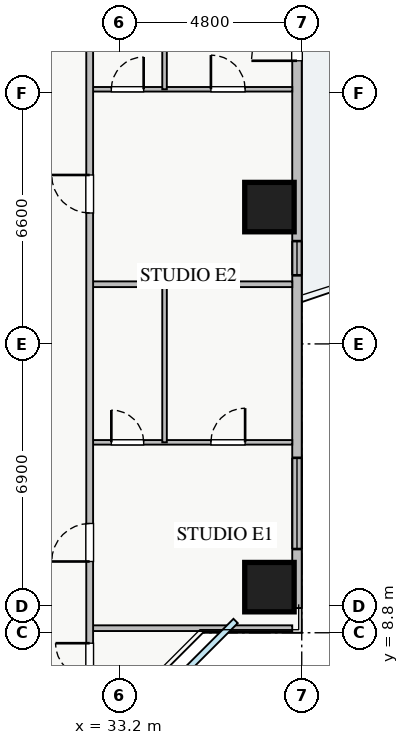
"""IFC4 building model, lengths in metres.
Left out: names, types, materials, properties, quantities, classifications, styles, units other than length and angle.
Written with IfcOpenShell. Run it as: python <this file> out.ifc"""

import sys

from ifc_helpers import new_model, si_unit, direction, frame, frame_2d, origin, origin_2d, place, context, subcontext, project, spatial, rectangle, extrude, source, transform, mapped, element, fill, save


model = new_model("IFC4")
c1 = context("Model", 3, precision=1e-05, world=origin(), true_north=direction((0.0, 1.0)))
c2 = subcontext(c1, "Body", "Model", "MODEL_VIEW")
j1 = project(units=[si_unit("LENGTHUNIT", "METRE"), si_unit("PLANEANGLEUNIT", "RADIAN")], contexts=[c1])
p1 = place(None, origin())
s1 = spatial("IfcSite", under=j1, at=p1, CompositionType="ELEMENT")
p2 = place(p1, origin())
s2 = spatial("IfcBuilding", under=s1, at=p2, CompositionType="ELEMENT")
p3 = place(p2, frame((0.0, 0.0, 36.0)))
s3 = spatial("IfcBuildingStorey", under=s2, at=p3, CompositionType="ELEMENT", Elevation=36.0)
m1 = source(origin(), c2, "Body", "SweptSolid", [
    extrude(rectangle(XDim=1.3, YDim=1.3, at=origin_2d()), origin(), (0.0, 0.0, 1.0), 3.25),
])
for number, where, z_axis, x_axis in (
    (1, (37.15, 10.0, 0.0), (0.0, 0.0, 1.0), (1.0, 0.0, 0.0)),
    (2, (37.15, 20.0, 0.0), (0.0, 0.0, 1.0), (1.0, 0.0, 0.0)),
):
    element("IfcColumn", number, at=place(p3, frame(where, z_axis=z_axis, x_axis=x_axis)), inside=s3, PredefinedType="COLUMN", context=c2, shape_type="MappedRepresentation", body=[
        mapped(m1, transform((0.0, 0.0, 0.0), x_axis=(1.0, 0.0, 0.0), y_axis=(0.0, 1.0, 0.0), z_axis=(0.0, 0.0, 1.0), scale=1.0)),
    ])
p4 = place(p3, frame((37.875, 9.45, 0.0), z_axis=(0.0, 0.0, 1.0), x_axis=(0.0, 1.0, 0.0)))
e3 = element("IfcWall", 3, at=p4, inside=s3, PredefinedType="STANDARD", context=c2, shape_type="SweptSolid", body=[
    extrude(rectangle(XDim=27.1, YDim=0.25, at=frame_2d((13.55, 0.0))), origin(), (0.0, 0.0, 1.0), 2.61),
])
p5 = place(p4, frame((14.4, 0.0, 0.0)))
e4 = element("IfcOpeningElement", 4, at=p5, cuts=e3, PredefinedType="OPENING", context=c2, shape_type="SweptSolid", body=[
    extrude(rectangle(XDim=1.2, YDim=2.1, at=frame_2d((0.6, 1.05))), frame((0.0, 0.135, 0.0), z_axis=(0.0, -1.0, 0.0), x_axis=(1.0, 0.0, 0.0)), (0.0, 0.0, 1.0), 0.27),
])
p6 = place(p4, frame((1.552, 0.0, 0.9)))
e5 = element("IfcOpeningElement", 5, at=p6, cuts=e3, PredefinedType="OPENING", context=c2, shape_type="SweptSolid", body=[
    extrude(rectangle(XDim=2.4, YDim=1.5, at=frame_2d((1.2, 0.75))), frame((0.0, 0.135, 0.0), z_axis=(0.0, -1.0, 0.0), x_axis=(1.0, 0.0, 0.0)), (0.0, 0.0, 1.0), 0.27),
])
p7 = place(p4, frame((23.788, 0.0, 0.9)))
e6 = element("IfcOpeningElement", 6, at=p7, cuts=e3, PredefinedType="OPENING", context=c2, shape_type="SweptSolid", body=[
    extrude(rectangle(XDim=1.8, YDim=1.5, at=frame_2d((0.9, 0.75))), frame((0.0, 0.135, 0.0), z_axis=(0.0, -1.0, 0.0), x_axis=(1.0, 0.0, 0.0)), (0.0, 0.0, 1.0), 0.27),
])
p8 = place(p4, frame((19.758, 0.0, 0.9)))
e7 = element("IfcOpeningElement", 7, at=p8, cuts=e3, PredefinedType="OPENING", context=c2, shape_type="SweptSolid", body=[
    extrude(rectangle(XDim=2.4, YDim=1.5, at=frame_2d((1.2, 0.75))), frame((0.0, 0.135, 0.0), z_axis=(0.0, -1.0, 0.0), x_axis=(1.0, 0.0, 0.0)), (0.0, 0.0, 1.0), 0.27),
])
p9 = place(p4, frame((8.755, 0.0, 0.9)))
e8 = element("IfcOpeningElement", 8, at=p9, cuts=e3, PredefinedType="OPENING", context=c2, shape_type="SweptSolid", body=[
    extrude(rectangle(XDim=0.9, YDim=1.2, at=frame_2d((0.45, 0.6))), frame((0.0, 0.135, 0.0), z_axis=(0.0, -1.0, 0.0), x_axis=(1.0, 0.0, 0.0)), (0.0, 0.0, 1.0), 0.27),
])
p10 = place(p3, frame((32.42, 8.92, 0.0), z_axis=(0.0, 0.0, 1.0), x_axis=(1.0, 0.0, 0.0)))
e9 = element("IfcWall", 9, at=p10, inside=s3, PredefinedType="PARTITIONING", context=c2, shape_type="SweptSolid", body=[
    extrude(rectangle(XDim=5.33, YDim=0.15, at=frame_2d((2.665, 0.0))), origin(), (0.0, 0.0, 1.0), 3.07),
])
p11 = place(p3, frame((32.42, 13.81, 0.0), z_axis=(0.0, 0.0, 1.0), x_axis=(1.0, 0.0, 0.0)))
e10 = element("IfcWall", 10, at=p11, inside=s3, PredefinedType="PLUMBINGWALL", context=c2, shape_type="SweptSolid", body=[
    extrude(rectangle(XDim=5.33, YDim=0.12, at=frame_2d((2.665, 0.0))), origin(), (0.0, 0.0, 1.0), 3.07),
])
p12 = place(p11, frame((0.57, 0.0, 0.0)))
e11 = element("IfcOpeningElement", 11, at=p12, cuts=e10, PredefinedType="OPENING", context=c2, shape_type="SweptSolid", body=[
    extrude(rectangle(XDim=0.85, YDim=2.05, at=frame_2d((0.425, 1.025))), frame((0.0, 0.07, 0.0), z_axis=(0.0, -1.0, 0.0), x_axis=(1.0, 0.0, 0.0)), (0.0, 0.0, 1.0), 0.14),
])
p13 = place(p11, frame((3.19, 0.0, 0.0)))
e12 = element("IfcOpeningElement", 12, at=p13, cuts=e10, PredefinedType="OPENING", context=c2, shape_type="SweptSolid", body=[
    extrude(rectangle(XDim=0.9, YDim=2.05, at=frame_2d((0.45, 1.025))), frame((0.0, 0.07, 0.0), z_axis=(0.0, -1.0, 0.0), x_axis=(1.0, 0.0, 0.0)), (0.0, 0.0, 1.0), 0.14),
])
p14 = place(p3, frame((34.39, 13.81, 0.0), z_axis=(0.0, 0.0, 1.0), x_axis=(0.0, 1.0, 0.0)))
e13 = element("IfcWall", 13, at=p14, inside=s3, PredefinedType="PLUMBINGWALL", context=c2, shape_type="SweptSolid", body=[
    extrude(rectangle(XDim=4.16, YDim=0.12, at=frame_2d((2.08, 0.0))), origin(), (0.0, 0.0, 1.0), 3.07),
])
p15 = place(p3, frame((32.42, 23.1, 0.0), z_axis=(0.0, 0.0, 1.0), x_axis=(1.0, 0.0, 0.0)))
e14 = element("IfcWall", 14, at=p15, inside=s3, PredefinedType="PLUMBINGWALL", context=c2, shape_type="SweptSolid", body=[
    extrude(rectangle(XDim=5.33, YDim=0.12, at=frame_2d((2.665, 0.0))), origin(), (0.0, 0.0, 1.0), 3.07),
])
p16 = place(p15, frame((0.57, 0.0, 0.0)))
e15 = element("IfcOpeningElement", 15, at=p16, cuts=e14, PredefinedType="OPENING", context=c2, shape_type="SweptSolid", body=[
    extrude(rectangle(XDim=0.85, YDim=2.05, at=frame_2d((0.425, 1.025))), frame((0.0, 0.07, 0.0), z_axis=(0.0, -1.0, 0.0), x_axis=(1.0, 0.0, 0.0)), (0.0, 0.0, 1.0), 0.14),
])
p17 = place(p15, frame((3.19, 0.0, 0.0)))
e16 = element("IfcOpeningElement", 16, at=p17, cuts=e14, PredefinedType="OPENING", context=c2, shape_type="SweptSolid", body=[
    extrude(rectangle(XDim=0.9, YDim=2.05, at=frame_2d((0.45, 1.025))), frame((0.0, 0.07, 0.0), z_axis=(0.0, -1.0, 0.0), x_axis=(1.0, 0.0, 0.0)), (0.0, 0.0, 1.0), 0.14),
])
p18 = place(p3, frame((34.39, 23.1, 0.0), z_axis=(0.0, 0.0, 1.0), x_axis=(0.0, 1.0, 0.0)))
e17 = element("IfcWall", 17, at=p18, inside=s3, PredefinedType="PLUMBINGWALL", context=c2, shape_type="SweptSolid", body=[
    extrude(rectangle(XDim=4.83, YDim=0.12, at=frame_2d((2.415, 0.0))), origin(), (0.0, 0.0, 1.0), 3.07),
])
p19 = place(p3, frame((32.42, 17.97, 0.0), z_axis=(0.0, 0.0, 1.0), x_axis=(1.0, 0.0, 0.0)))
e18 = element("IfcWall", 18, at=p19, inside=s3, PredefinedType="PARTITIONING", context=c2, shape_type="SweptSolid", body=[
    extrude(rectangle(XDim=5.33, YDim=0.15, at=frame_2d((2.665, 0.0))), origin(), (0.0, 0.0, 1.0), 3.07),
])
p20 = place(p3, frame((32.42, 7.21, 0.0), z_axis=(0.0, 0.0, 1.0), x_axis=(0.0, 1.0, 0.0)))
e19 = element("IfcWall", 19, at=p20, inside=s3, PredefinedType="PARTITIONING", context=c2, shape_type="SweptSolid", body=[
    extrude(rectangle(XDim=31.23, YDim=0.18, at=frame_2d((15.615, 0.0))), origin(), (0.0, 0.0, 1.0), 2.815),
])
p21 = place(p20, frame((30.09, 0.0, 0.0)))
e20 = element("IfcOpeningElement", 20, at=p21, cuts=e19, PredefinedType="OPENING", context=c2, shape_type="SweptSolid", body=[
    extrude(rectangle(XDim=0.9, YDim=2.05, at=frame_2d((0.45, 1.025))), frame((0.0, 0.1, 0.0), z_axis=(0.0, -1.0, 0.0), x_axis=(1.0, 0.0, 0.0)), (0.0, 0.0, 1.0), 0.2),
])
p22 = place(p20, frame((0.415, 0.0, 0.0)))
e21 = element("IfcOpeningElement", 21, at=p22, cuts=e19, PredefinedType="OPENING", context=c2, shape_type="SweptSolid", body=[
    extrude(rectangle(XDim=0.9, YDim=2.05, at=frame_2d((0.45, 1.025))), frame((0.0, 0.1, 0.0), z_axis=(0.0, -1.0, 0.0), x_axis=(1.0, 0.0, 0.0)), (0.0, 0.0, 1.0), 0.2),
])
p23 = place(p20, frame((3.465, 0.0, 0.0)))
e22 = element("IfcOpeningElement", 22, at=p23, cuts=e19, PredefinedType="OPENING", context=c2, shape_type="SweptSolid", body=[
    extrude(rectangle(XDim=1.0, YDim=2.05, at=frame_2d((0.5, 1.025))), frame((0.0, 0.1, 0.0), z_axis=(0.0, -1.0, 0.0), x_axis=(1.0, 0.0, 0.0)), (0.0, 0.0, 1.0), 0.2),
])
p24 = place(p20, frame((12.635, 0.0, 0.0)))
e23 = element("IfcOpeningElement", 23, at=p24, cuts=e19, PredefinedType="OPENING", context=c2, shape_type="SweptSolid", body=[
    extrude(rectangle(XDim=1.0, YDim=2.05, at=frame_2d((0.5, 1.025))), frame((0.0, 0.1, 0.0), z_axis=(0.0, -1.0, 0.0), x_axis=(1.0, 0.0, 0.0)), (0.0, 0.0, 1.0), 0.2),
])
p25 = place(p20, frame((22.5, 0.0, 0.0)))
e24 = element("IfcOpeningElement", 24, at=p25, cuts=e19, PredefinedType="OPENING", context=c2, shape_type="SweptSolid", body=[
    extrude(rectangle(XDim=1.0, YDim=2.05, at=frame_2d((0.5, 1.025))), frame((0.0, 0.1, 0.0), z_axis=(0.0, -1.0, 0.0), x_axis=(1.0, 0.0, 0.0)), (0.0, 0.0, 1.0), 0.2),
])
m2 = source(origin(), c2, "Body", "SweptSolid", [
    extrude(rectangle(XDim=1.2, YDim=2.1, at=frame_2d((0.6, 1.05))), frame((0.0, 0.025, 0.0), z_axis=(0.0, -1.0, 0.0), x_axis=(1.0, 0.0, 0.0)), (0.0, 0.0, 1.0), 0.05),
])
p26 = place(p5, origin())
e25 = element("IfcDoor", 25, at=p26, inside=s3, OperationType="SINGLE_SWING_LEFT", PredefinedType="DOOR", context=c2, shape_type="MappedRepresentation", body=[
    mapped(m2, transform((0.0, 0.0, 0.0), x_axis=(1.0, 0.0, 0.0), y_axis=(0.0, 1.0, 0.0), z_axis=(0.0, 0.0, 1.0), scale=1.0)),
])
fill(e4, e25)
m3 = source(origin(), c2, "Body", "SweptSolid", [
    extrude(rectangle(XDim=2.4, YDim=1.5, at=frame_2d((1.2, 0.75))), frame((0.0, 0.03, 0.0), z_axis=(0.0, -1.0, 0.0), x_axis=(1.0, 0.0, 0.0)), (0.0, 0.0, 1.0), 0.06),
])
p27 = place(p6, origin())
e26 = element("IfcWindow", 26, at=p27, inside=s3, PartitioningType="TRIPLE_PANEL_VERTICAL", PredefinedType="WINDOW", context=c2, shape_type="MappedRepresentation", body=[
    mapped(m3, transform((0.0, 0.0, 0.0), x_axis=(1.0, 0.0, 0.0), y_axis=(0.0, 1.0, 0.0), z_axis=(0.0, 0.0, 1.0), scale=1.0)),
])
fill(e5, e26)
m4 = source(origin(), c2, "Body", "SweptSolid", [
    extrude(rectangle(XDim=0.85, YDim=2.05, at=frame_2d((0.425, 1.025))), frame((0.0, 0.025, 0.0), z_axis=(0.0, -1.0, 0.0), x_axis=(1.0, 0.0, 0.0)), (0.0, 0.0, 1.0), 0.05),
])
p28 = place(p12, origin())
e27 = element("IfcDoor", 27, at=p28, inside=s3, OperationType="SINGLE_SWING_LEFT", PredefinedType="DOOR", context=c2, shape_type="MappedRepresentation", body=[
    mapped(m4, transform((0.0, 0.0, 0.0), x_axis=(1.0, 0.0, 0.0), y_axis=(0.0, 1.0, 0.0), z_axis=(0.0, 0.0, 1.0), scale=1.0)),
])
fill(e11, e27)
m5 = source(origin(), c2, "Body", "SweptSolid", [
    extrude(rectangle(XDim=0.9, YDim=2.05, at=frame_2d((0.45, 1.025))), frame((0.0, 0.025, 0.0), z_axis=(0.0, -1.0, 0.0), x_axis=(1.0, 0.0, 0.0)), (0.0, 0.0, 1.0), 0.05),
])
p29 = place(p13, origin())
e28 = element("IfcDoor", 28, at=p29, inside=s3, OperationType="SINGLE_SWING_RIGHT", PredefinedType="DOOR", context=c2, shape_type="MappedRepresentation", body=[
    mapped(m5, transform((0.0, 0.0, 0.0), x_axis=(1.0, 0.0, 0.0), y_axis=(0.0, 1.0, 0.0), z_axis=(0.0, 0.0, 1.0), scale=1.0)),
])
fill(e12, e28)
p30 = place(p16, origin())
e29 = element("IfcDoor", 29, at=p30, inside=s3, OperationType="SINGLE_SWING_RIGHT", PredefinedType="DOOR", context=c2, shape_type="MappedRepresentation", body=[
    mapped(m4, transform((0.0, 0.0, 0.0), x_axis=(1.0, 0.0, 0.0), y_axis=(0.0, 1.0, 0.0), z_axis=(0.0, 0.0, 1.0), scale=1.0)),
])
fill(e15, e29)
p31 = place(p17, origin())
e30 = element("IfcDoor", 30, at=p31, inside=s3, OperationType="SINGLE_SWING_LEFT", PredefinedType="DOOR", context=c2, shape_type="MappedRepresentation", body=[
    mapped(m5, transform((0.0, 0.0, 0.0), x_axis=(1.0, 0.0, 0.0), y_axis=(0.0, 1.0, 0.0), z_axis=(0.0, 0.0, 1.0), scale=1.0)),
])
fill(e16, e30)
p32 = place(p22, origin())
e31 = element("IfcDoor", 31, at=p32, inside=s3, OperationType="SINGLE_SWING_RIGHT", PredefinedType="DOOR", context=c2, shape_type="MappedRepresentation", body=[
    mapped(m5, transform((0.0, 0.0, 0.0), x_axis=(1.0, 0.0, 0.0), y_axis=(0.0, 1.0, 0.0), z_axis=(0.0, 0.0, 1.0), scale=1.0)),
])
fill(e21, e31)
m6 = source(origin(), c2, "Body", "SweptSolid", [
    extrude(rectangle(XDim=1.0, YDim=2.05, at=frame_2d((0.5, 1.025))), frame((0.0, 0.025, 0.0), z_axis=(0.0, -1.0, 0.0), x_axis=(1.0, 0.0, 0.0)), (0.0, 0.0, 1.0), 0.05),
])
p33 = place(p23, origin())
e32 = element("IfcDoor", 32, at=p33, inside=s3, OperationType="SINGLE_SWING_LEFT", PredefinedType="DOOR", context=c2, shape_type="MappedRepresentation", body=[
    mapped(m6, transform((0.0, 0.0, 0.0), x_axis=(1.0, 0.0, 0.0), y_axis=(0.0, 1.0, 0.0), z_axis=(0.0, 0.0, 1.0), scale=1.0)),
])
fill(e22, e32)
p34 = place(p24, origin())
e33 = element("IfcDoor", 33, at=p34, inside=s3, OperationType="SINGLE_SWING_RIGHT", PredefinedType="DOOR", context=c2, shape_type="MappedRepresentation", body=[
    mapped(m6, transform((0.0, 0.0, 0.0), x_axis=(1.0, 0.0, 0.0), y_axis=(0.0, 1.0, 0.0), z_axis=(0.0, 0.0, 1.0), scale=1.0)),
])
fill(e23, e33)
m7 = source(origin(), c2, "Body", "SweptSolid", [
    extrude(rectangle(XDim=0.9, YDim=1.2, at=frame_2d((0.45, 0.6))), frame((0.0, 0.03, 0.0), z_axis=(0.0, -1.0, 0.0), x_axis=(1.0, 0.0, 0.0)), (0.0, 0.0, 1.0), 0.06),
])
p35 = place(p9, origin())
e34 = element("IfcWindow", 34, at=p35, inside=s3, PartitioningType="SINGLE_PANEL", PredefinedType="WINDOW", context=c2, shape_type="MappedRepresentation", body=[
    mapped(m7, transform((0.0, 0.0, 0.0), x_axis=(1.0, 0.0, 0.0), y_axis=(0.0, 1.0, 0.0), z_axis=(0.0, 0.0, 1.0), scale=1.0)),
])
fill(e8, e34)
save(model, sys.argv[1])
